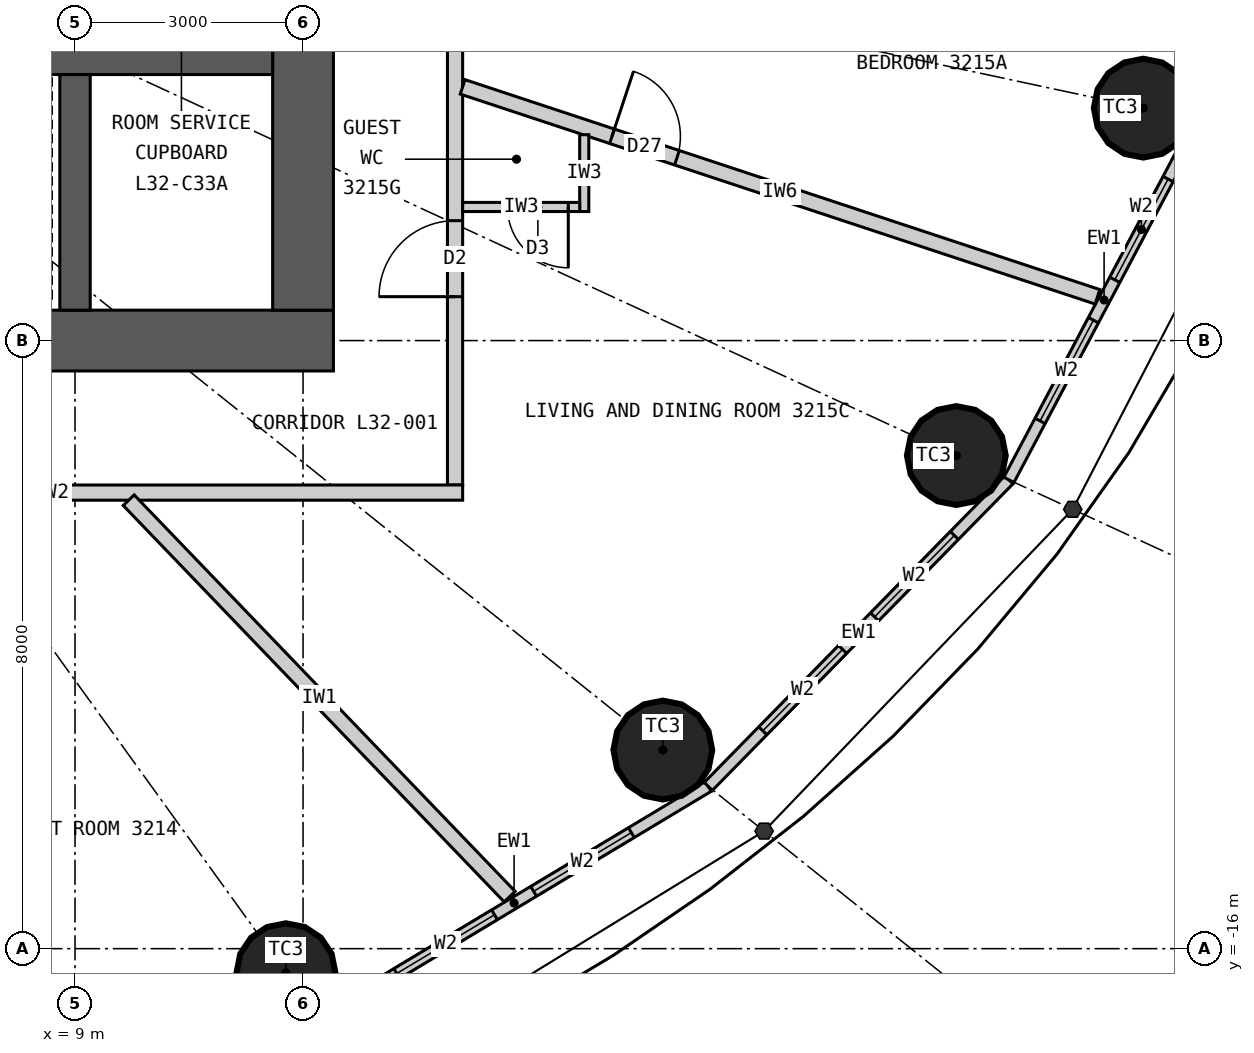
"""IFC4 building model, lengths in metres.
Left out: names, types, materials, properties, quantities, classifications, styles, units other than length and angle.
Written with IfcOpenShell. Run it as: python <this file> out.ifc"""

import sys

from ifc_helpers import new_model, si_unit, direction, frame, frame_2d, origin, origin_2d, place, context, subcontext, project, spatial, rectangle, circle, extrude, element, fill, save


model = new_model("IFC4")
c1 = context("Model", 3, precision=1e-05, world=origin(), true_north=direction((0.0, 1.0)))
c2 = subcontext(c1, "Body", "Model", "MODEL_VIEW")
j1 = project(units=[si_unit("LENGTHUNIT", "METRE"), si_unit("PLANEANGLEUNIT", "RADIAN")], contexts=[c1])
p1 = place(None, origin())
s1 = spatial("IfcSite", under=j1, at=p1, CompositionType="ELEMENT")
p2 = place(p1, origin())
s2 = spatial("IfcBuilding", under=s1, at=p2, CompositionType="ELEMENT")
p3 = place(p2, frame((0.0, 0.0, 125.4)))
s3 = spatial("IfcBuildingStorey", under=s2, at=p3, CompositionType="ELEMENT", Elevation=125.4)
for number, where, z_axis, x_axis in (
    (1, (11.775, -16.316, 0.0), (0.0, 0.0, 1.0), (1.0, 0.0, 0.0)),
    (2, (16.734, -13.387, 0.0), (0.0, 0.0, 1.0), (1.0, 0.0, 0.0)),
    (3, (20.596, -9.513, 0.0), (0.0, 0.0, 1.0), (1.0, 0.0, 0.0)),
    (4, (23.055, -4.942, 0.0), (0.0, 0.0, 1.0), (1.0, 0.0, 0.0)),
):
    element("IfcColumn", number, at=place(p3, frame(where, z_axis=z_axis, x_axis=x_axis)), inside=s3, PredefinedType="COLUMN", context=c2, shape_type="SweptSolid", body=[
        extrude(circle(Radius=0.65, at=origin_2d()), origin(), (0.0, 0.0, 1.0), 3.3),
    ])
p4 = place(p3, frame((12.4, -8.0, 0.0), z_axis=(0.0, 0.0, 1.0), x_axis=(-1.0, 0.0, 0.0)))
e5 = element("IfcWall", 5, at=p4, inside=s3, PredefinedType="SHEAR", context=c2, shape_type="SweptSolid", body=[
    extrude(rectangle(XDim=24.8, YDim=0.8, at=frame_2d((12.4, 0.0))), origin(), (0.0, 0.0, 1.0), 3.3),
])
p5 = place(p4, frame((11.1, 0.0, 0.0)))
e6 = element("IfcOpeningElement", 6, at=p5, cuts=e5, PredefinedType="OPENING", context=c2, shape_type="SweptSolid", body=[
    extrude(rectangle(XDim=1.2, YDim=2.2, at=frame_2d((0.6, 1.1))), frame((0.0, 0.41, 0.0), z_axis=(0.0, -1.0, 0.0), x_axis=(1.0, 0.0, 0.0)), (0.0, 0.0, 1.0), 0.82),
])
p6 = place(p4, frame((18.7, 0.0, 0.0)))
e7 = element("IfcOpeningElement", 7, at=p6, cuts=e5, PredefinedType="OPENING", context=c2, shape_type="SweptSolid", body=[
    extrude(rectangle(XDim=0.9, YDim=2.2, at=frame_2d((0.45, 1.1))), frame((0.0, 0.41, 0.0), z_axis=(0.0, -1.0, 0.0), x_axis=(1.0, 0.0, 0.0)), (0.0, 0.0, 1.0), 0.82),
])
p7 = place(p3, frame((12.0, -7.6, 0.0), z_axis=(0.0, 0.0, 1.0), x_axis=(0.0, 1.0, 0.0)))
e8 = element("IfcWall", 8, at=p7, inside=s3, PredefinedType="SHEAR", context=c2, shape_type="SweptSolid", body=[
    extrude(rectangle(XDim=15.2, YDim=0.8, at=frame_2d((7.6, 0.0))), origin(), (0.0, 0.0, 1.0), 3.3),
])
p8 = place(p7, frame((6.7, 0.0, 0.0)))
e9 = element("IfcOpeningElement", 9, at=p8, cuts=e8, PredefinedType="OPENING", context=c2, shape_type="SweptSolid", body=[
    extrude(rectangle(XDim=1.8, YDim=2.2, at=frame_2d((0.9, 1.1))), frame((0.0, 0.41, 0.0), z_axis=(0.0, -1.0, 0.0), x_axis=(1.0, 0.0, 0.0)), (0.0, 0.0, 1.0), 0.82),
])
p9 = place(p3, frame((-11.6, -4.3, 0.0), z_axis=(0.0, 0.0, 1.0), x_axis=(1.0, 0.0, 0.0)))
e10 = element("IfcWall", 10, at=p9, inside=s3, PredefinedType="SHEAR", context=c2, shape_type="SweptSolid", body=[
    extrude(rectangle(XDim=23.2, YDim=0.4, at=frame_2d((11.6, 0.0))), origin(), (0.0, 0.0, 1.0), 3.3),
])
p10 = place(p3, frame((9.0, -7.6, 0.0), z_axis=(0.0, 0.0, 1.0), x_axis=(0.0, 1.0, 0.0)))
e11 = element("IfcWall", 11, at=p10, inside=s3, PredefinedType="SHEAR", context=c2, shape_type="SweptSolid", body=[
    extrude(rectangle(XDim=3.1, YDim=0.4, at=frame_2d((1.55, 0.0))), origin(), (0.0, 0.0, 1.0), 3.3),
])
p11 = place(p3, frame((12.221, -16.935, 0.0), z_axis=(0.0, 0.0, 1.0), x_axis=(0.857308573723, 0.514802884044, 0.0)))
e12 = element("IfcWall", 12, at=p11, inside=s3, PredefinedType="ELEMENTEDWALL", context=c2, shape_type="SweptSolid", body=[
    extrude(rectangle(XDim=5.961, YDim=0.15, at=frame_2d((2.98, 0.0))), origin(), (0.0, 0.0, 1.0), 3.12),
])
p12 = place(p11, frame((1.181, 0.0, 0.9)))
e13 = element("IfcOpeningElement", 13, at=p12, cuts=e12, PredefinedType="OPENING", context=c2, shape_type="SweptSolid", body=[
    extrude(rectangle(XDim=1.5, YDim=1.9, at=frame_2d((0.75, 0.95))), frame((0.0, 0.085, 0.0), z_axis=(0.0, -1.0, 0.0), x_axis=(1.0, 0.0, 0.0)), (0.0, 0.0, 1.0), 0.17),
])
p13 = place(p11, frame((3.281, 0.0, 0.9)))
e14 = element("IfcOpeningElement", 14, at=p13, cuts=e12, PredefinedType="OPENING", context=c2, shape_type="SweptSolid", body=[
    extrude(rectangle(XDim=1.5, YDim=1.9, at=frame_2d((0.75, 0.95))), frame((0.0, 0.085, 0.0), z_axis=(0.0, -1.0, 0.0), x_axis=(1.0, 0.0, 0.0)), (0.0, 0.0, 1.0), 0.17),
])
p14 = place(p3, frame((17.332, -13.866, 0.0), z_axis=(0.0, 0.0, 1.0), x_axis=(0.700136650834, 0.714008872605, 0.0)))
e15 = element("IfcWall", 15, at=p14, inside=s3, PredefinedType="ELEMENTEDWALL", context=c2, shape_type="SweptSolid", body=[
    extrude(rectangle(XDim=5.649, YDim=0.15, at=frame_2d((2.825, 0.0))), origin(), (0.0, 0.0, 1.0), 3.12),
])
p15 = place(p14, frame((1.025, 0.0, 0.9)))
e16 = element("IfcOpeningElement", 16, at=p15, cuts=e15, PredefinedType="OPENING", context=c2, shape_type="SweptSolid", body=[
    extrude(rectangle(XDim=1.5, YDim=1.9, at=frame_2d((0.75, 0.95))), frame((0.0, 0.085, 0.0), z_axis=(0.0, -1.0, 0.0), x_axis=(1.0, 0.0, 0.0)), (0.0, 0.0, 1.0), 0.17),
])
p16 = place(p14, frame((3.125, 0.0, 0.9)))
e17 = element("IfcOpeningElement", 17, at=p16, cuts=e15, PredefinedType="OPENING", context=c2, shape_type="SweptSolid", body=[
    extrude(rectangle(XDim=1.5, YDim=1.9, at=frame_2d((0.75, 0.95))), frame((0.0, 0.085, 0.0), z_axis=(0.0, -1.0, 0.0), x_axis=(1.0, 0.0, 0.0)), (0.0, 0.0, 1.0), 0.17),
])
p17 = place(p3, frame((21.287, -9.832, 0.0), z_axis=(0.0, 0.0, 1.0), x_axis=(0.467814388454, 0.883826735257, 0.0)))
e18 = element("IfcWall", 18, at=p17, inside=s3, PredefinedType="ELEMENTEDWALL", context=c2, shape_type="SweptSolid", body=[
    extrude(rectangle(XDim=5.354, YDim=0.15, at=frame_2d((2.677, 0.0))), origin(), (0.0, 0.0, 1.0), 3.12),
])
p18 = place(p17, frame((0.877, 0.0, 0.9)))
e19 = element("IfcOpeningElement", 19, at=p18, cuts=e18, PredefinedType="OPENING", context=c2, shape_type="SweptSolid", body=[
    extrude(rectangle(XDim=1.5, YDim=1.9, at=frame_2d((0.75, 0.95))), frame((0.0, 0.085, 0.0), z_axis=(0.0, -1.0, 0.0), x_axis=(1.0, 0.0, 0.0)), (0.0, 0.0, 1.0), 0.17),
])
p19 = place(p17, frame((2.977, 0.0, 0.9)))
e20 = element("IfcOpeningElement", 20, at=p19, cuts=e18, PredefinedType="OPENING", context=c2, shape_type="SweptSolid", body=[
    extrude(rectangle(XDim=1.5, YDim=1.9, at=frame_2d((0.75, 0.95))), frame((0.0, 0.085, 0.0), z_axis=(0.0, -1.0, 0.0), x_axis=(1.0, 0.0, 0.0)), (0.0, 0.0, 1.0), 0.17),
])
p20 = place(p3, frame((14.0, -9.9, 0.0), z_axis=(0.0, 0.0, 1.0), x_axis=(0.0, 1.0, 0.0)))
e21 = element("IfcWall", 21, at=p20, inside=s3, PredefinedType="PARTITIONING", context=c2, shape_type="SweptSolid", body=[
    extrude(rectangle(XDim=19.8, YDim=0.2, at=frame_2d((9.9, 0.0))), origin(), (0.0, 0.0, 1.0), 3.12),
])
p21 = place(p20, frame((2.478, 0.0, 0.0)))
e22 = element("IfcOpeningElement", 22, at=p21, cuts=e21, PredefinedType="OPENING", context=c2, shape_type="SweptSolid", body=[
    extrude(rectangle(XDim=1.0, YDim=2.2, at=frame_2d((0.5, 1.1))), frame((0.0, 0.11, 0.0), z_axis=(0.0, -1.0, 0.0), x_axis=(1.0, 0.0, 0.0)), (0.0, 0.0, 1.0), 0.22),
])
p22 = place(p20, frame((8.838, 0.0, 0.0)))
e23 = element("IfcOpeningElement", 23, at=p22, cuts=e21, PredefinedType="OPENING", context=c2, shape_type="SweptSolid", body=[
    extrude(rectangle(XDim=1.0, YDim=2.2, at=frame_2d((0.5, 1.1))), frame((0.0, 0.11, 0.0), z_axis=(0.0, -1.0, 0.0), x_axis=(1.0, 0.0, 0.0)), (0.0, 0.0, 1.0), 0.22),
])
p23 = place(p20, frame((13.742, 0.0, 0.0)))
e24 = element("IfcOpeningElement", 24, at=p23, cuts=e21, PredefinedType="OPENING", context=c2, shape_type="SweptSolid", body=[
    extrude(rectangle(XDim=1.0, YDim=2.2, at=frame_2d((0.5, 1.1))), frame((0.0, 0.11, 0.0), z_axis=(0.0, -1.0, 0.0), x_axis=(1.0, 0.0, 0.0)), (0.0, 0.0, 1.0), 0.22),
])
p24 = place(p20, frame((18.698, 0.0, 0.0)))
e25 = element("IfcOpeningElement", 25, at=p24, cuts=e21, PredefinedType="OPENING", context=c2, shape_type="SweptSolid", body=[
    extrude(rectangle(XDim=1.0, YDim=2.2, at=frame_2d((0.5, 1.1))), frame((0.0, 0.11, 0.0), z_axis=(0.0, -1.0, 0.0), x_axis=(1.0, 0.0, 0.0)), (0.0, 0.0, 1.0), 0.22),
])
p25 = place(p3, frame((14.1, -10.0, 0.0), z_axis=(0.0, 0.0, 1.0), x_axis=(-1.0, 0.0, 0.0)))
e26 = element("IfcWall", 26, at=p25, inside=s3, PredefinedType="PARTITIONING", context=c2, shape_type="SweptSolid", body=[
    extrude(rectangle(XDim=10.817, YDim=0.2, at=frame_2d((5.409, 0.0))), origin(), (0.0, 0.0, 1.0), 3.12),
])
p26 = place(p3, frame((9.706, -10.1, 0.0), z_axis=(0.0, 0.0, 1.0), x_axis=(0.692944801824, -0.720990639069, 0.0)))
e27 = element("IfcWall", 27, at=p26, inside=s3, PredefinedType="PARTITIONING", context=c2, shape_type="SweptSolid", body=[
    extrude(rectangle(XDim=7.234, YDim=0.2, at=frame_2d((3.617, 0.0))), origin(), (0.0, 0.0, 1.0), 3.12),
])
p27 = place(p3, frame((14.1, -4.662, 0.0), z_axis=(0.0, 0.0, 1.0), x_axis=(0.949446466373, -0.313928984789, 0.0)))
e28 = element("IfcWall", 28, at=p27, inside=s3, PredefinedType="PARTITIONING", context=c2, shape_type="SweptSolid", body=[
    extrude(rectangle(XDim=8.797, YDim=0.2, at=frame_2d((4.399, 0.0))), origin(), (0.0, 0.0, 1.0), 3.12),
])
p28 = place(p27, frame((2.07, 0.0, 0.0)))
e29 = element("IfcOpeningElement", 29, at=p28, cuts=e28, PredefinedType="OPENING", context=c2, shape_type="SweptSolid", body=[
    extrude(rectangle(XDim=0.9, YDim=2.1, at=frame_2d((0.45, 1.05))), frame((0.0, 0.11, 0.0), z_axis=(0.0, -1.0, 0.0), x_axis=(1.0, 0.0, 0.0)), (0.0, 0.0, 1.0), 0.22),
])
p29 = place(p3, frame((15.7, -5.291, 0.0), z_axis=(0.0, 0.0, 1.0), x_axis=(0.0, -1.0, 0.0)))
e30 = element("IfcWall", 30, at=p29, inside=s3, PredefinedType="PARTITIONING", context=c2, shape_type="SweptSolid", body=[
    extrude(rectangle(XDim=1.011, YDim=0.12, at=frame_2d((0.505, 0.0))), origin(), (0.0, 0.0, 1.0), 3.12),
])
p30 = place(p3, frame((14.1, -6.242, 0.0), z_axis=(0.0, 0.0, 1.0), x_axis=(1.0, 0.0, 0.0)))
e31 = element("IfcWall", 31, at=p30, inside=s3, PredefinedType="PARTITIONING", context=c2, shape_type="SweptSolid", body=[
    extrude(rectangle(XDim=1.54, YDim=0.12, at=frame_2d((0.77, 0.0))), origin(), (0.0, 0.0, 1.0), 3.12),
])
p31 = place(p30, frame((0.59, 0.0, 0.0)))
e32 = element("IfcOpeningElement", 32, at=p31, cuts=e31, PredefinedType="OPENING", context=c2, shape_type="SweptSolid", body=[
    extrude(rectangle(XDim=0.8, YDim=2.1, at=frame_2d((0.4, 1.05))), frame((0.0, 0.07, 0.0), z_axis=(0.0, -1.0, 0.0), x_axis=(1.0, 0.0, 0.0)), (0.0, 0.0, 1.0), 0.14),
])
p32 = place(p12, origin())
e33 = element("IfcWindow", 33, at=p32, inside=s3, PartitioningType="SINGLE_PANEL", PredefinedType="WINDOW", context=c2, shape_type="SweptSolid", body=[
    extrude(rectangle(XDim=1.5, YDim=1.9, at=frame_2d((0.75, 0.95))), frame((0.0, 0.03, 0.0), z_axis=(0.0, -1.0, 0.0), x_axis=(1.0, 0.0, 0.0)), (0.0, 0.0, 1.0), 0.06),
])
fill(e13, e33)
p33 = place(p13, origin())
e34 = element("IfcWindow", 34, at=p33, inside=s3, PartitioningType="SINGLE_PANEL", PredefinedType="WINDOW", context=c2, shape_type="SweptSolid", body=[
    extrude(rectangle(XDim=1.5, YDim=1.9, at=frame_2d((0.75, 0.95))), frame((0.0, 0.03, 0.0), z_axis=(0.0, -1.0, 0.0), x_axis=(1.0, 0.0, 0.0)), (0.0, 0.0, 1.0), 0.06),
])
fill(e14, e34)
p34 = place(p15, origin())
e35 = element("IfcWindow", 35, at=p34, inside=s3, PartitioningType="SINGLE_PANEL", PredefinedType="WINDOW", context=c2, shape_type="SweptSolid", body=[
    extrude(rectangle(XDim=1.5, YDim=1.9, at=frame_2d((0.75, 0.95))), frame((0.0, 0.03, 0.0), z_axis=(0.0, -1.0, 0.0), x_axis=(1.0, 0.0, 0.0)), (0.0, 0.0, 1.0), 0.06),
])
fill(e16, e35)
p35 = place(p16, origin())
e36 = element("IfcWindow", 36, at=p35, inside=s3, PartitioningType="SINGLE_PANEL", PredefinedType="WINDOW", context=c2, shape_type="SweptSolid", body=[
    extrude(rectangle(XDim=1.5, YDim=1.9, at=frame_2d((0.75, 0.95))), frame((0.0, 0.03, 0.0), z_axis=(0.0, -1.0, 0.0), x_axis=(1.0, 0.0, 0.0)), (0.0, 0.0, 1.0), 0.06),
])
fill(e17, e36)
p36 = place(p18, origin())
e37 = element("IfcWindow", 37, at=p36, inside=s3, PartitioningType="SINGLE_PANEL", PredefinedType="WINDOW", context=c2, shape_type="SweptSolid", body=[
    extrude(rectangle(XDim=1.5, YDim=1.9, at=frame_2d((0.75, 0.95))), frame((0.0, 0.03, 0.0), z_axis=(0.0, -1.0, 0.0), x_axis=(1.0, 0.0, 0.0)), (0.0, 0.0, 1.0), 0.06),
])
fill(e19, e37)
p37 = place(p19, origin())
e38 = element("IfcWindow", 38, at=p37, inside=s3, PartitioningType="SINGLE_PANEL", PredefinedType="WINDOW", context=c2, shape_type="SweptSolid", body=[
    extrude(rectangle(XDim=1.5, YDim=1.9, at=frame_2d((0.75, 0.95))), frame((0.0, 0.03, 0.0), z_axis=(0.0, -1.0, 0.0), x_axis=(1.0, 0.0, 0.0)), (0.0, 0.0, 1.0), 0.06),
])
fill(e20, e38)
p38 = place(p31, origin())
e39 = element("IfcDoor", 39, at=p38, inside=s3, OperationType="SINGLE_SWING_RIGHT", PredefinedType="DOOR", context=c2, shape_type="SweptSolid", body=[
    extrude(rectangle(XDim=0.8, YDim=2.1, at=frame_2d((0.4, 1.05))), frame((0.0, 0.025, 0.0), z_axis=(0.0, -1.0, 0.0), x_axis=(1.0, 0.0, 0.0)), (0.0, 0.0, 1.0), 0.05),
])
fill(e32, e39)
p39 = place(p21, origin())
e40 = element("IfcDoor", 40, at=p39, inside=s3, OperationType="SINGLE_SWING_LEFT", PredefinedType="DOOR", context=c2, shape_type="SweptSolid", body=[
    extrude(rectangle(XDim=1.0, YDim=2.2, at=frame_2d((0.5, 1.1))), frame((0.0, 0.025, 0.0), z_axis=(0.0, -1.0, 0.0), x_axis=(1.0, 0.0, 0.0)), (0.0, 0.0, 1.0), 0.05),
])
fill(e22, e40)
p40 = place(p28, origin())
e41 = element("IfcDoor", 41, at=p40, inside=s3, OperationType="SINGLE_SWING_LEFT", PredefinedType="DOOR", context=c2, shape_type="SweptSolid", body=[
    extrude(rectangle(XDim=0.9, YDim=2.1, at=frame_2d((0.45, 1.05))), frame((0.0, 0.025, 0.0), z_axis=(0.0, -1.0, 0.0), x_axis=(1.0, 0.0, 0.0)), (0.0, 0.0, 1.0), 0.05),
])
fill(e29, e41)
save(model, sys.argv[1])
